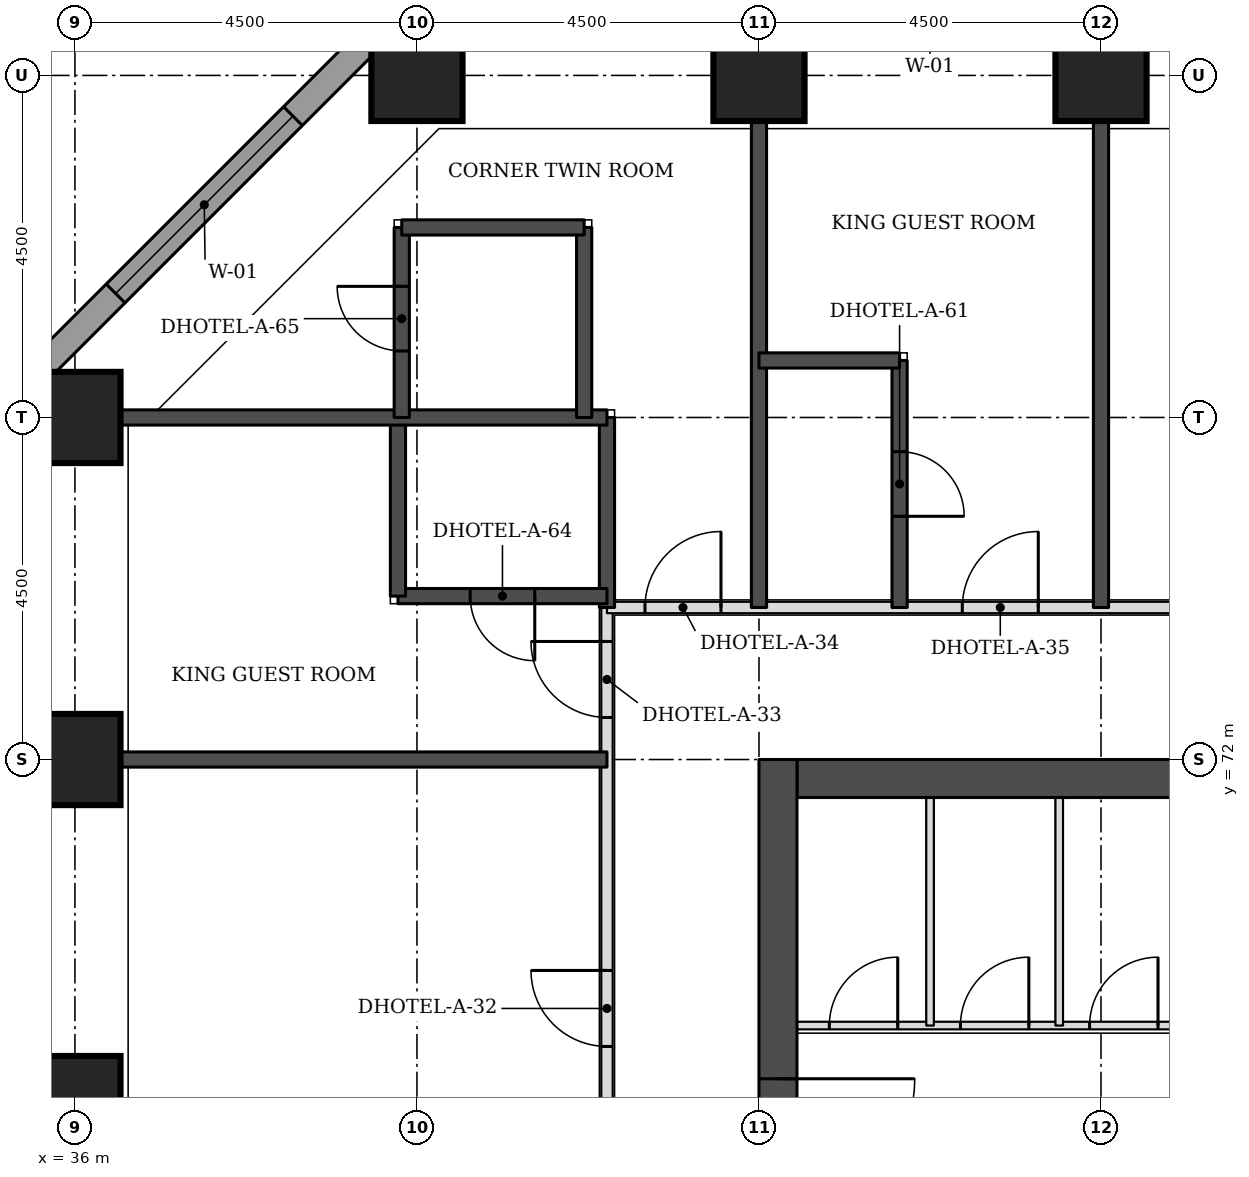
"""IFC4 building model, lengths in metres.
Left out: names, types, materials, properties, quantities, classifications, styles, units other than length and angle.
Written with IfcOpenShell. Run it as: python <this file> out.ifc"""

import sys

from ifc_helpers import new_model, si_unit, direction, frame, frame_2d, origin, origin_2d, place, context, subcontext, project, spatial, rectangle, extrude, element, fill, save


model = new_model("IFC4")
c1 = context("Model", 3, precision=1e-05, world=origin(), true_north=direction((0.0, 1.0)))
c2 = subcontext(c1, "Body", "Model", "MODEL_VIEW")
j1 = project(units=[si_unit("LENGTHUNIT", "METRE"), si_unit("PLANEANGLEUNIT", "RADIAN")], contexts=[c1])
p1 = place(None, origin())
s1 = spatial("IfcSite", under=j1, at=p1, CompositionType="ELEMENT")
p2 = place(p1, origin())
s2 = spatial("IfcBuilding", under=s1, at=p2, CompositionType="ELEMENT")
p3 = place(p2, frame((0.0, 0.0, 49.5)))
s3 = spatial("IfcBuildingStorey", under=s2, at=p3, CompositionType="ELEMENT", Elevation=49.5)
for number, where, z_axis, x_axis in (
    (1, (36.0, 67.5, 0.0), (0.0, 0.0, 1.0), (1.0, 0.0, 0.0)),
    (2, (36.0, 72.0, 0.0), (0.0, 0.0, 1.0), (1.0, 0.0, 0.0)),
    (3, (36.0, 76.5, 0.0), (0.0, 0.0, 1.0), (1.0, 0.0, 0.0)),
    (4, (40.5, 81.0, 0.0), (0.0, 0.0, 1.0), (1.0, 0.0, 0.0)),
    (5, (45.0, 81.0, 0.0), (0.0, 0.0, 1.0), (1.0, 0.0, 0.0)),
    (6, (49.5, 81.0, 0.0), (0.0, 0.0, 1.0), (1.0, 0.0, 0.0)),
):
    element("IfcColumn", number, at=place(p3, frame(where, z_axis=z_axis, x_axis=x_axis)), inside=s3, PredefinedType="COLUMN", context=c2, shape_type="SweptSolid", body=[
        extrude(rectangle(XDim=1.2, YDim=1.2, at=origin_2d()), origin(), (0.0, 0.0, 1.0), 3.3),
    ])
p4 = place(p3, frame((45.5, 71.75, 0.0), z_axis=(0.0, 0.0, 1.0), x_axis=(1.0, 0.0, 0.0)))
e7 = element("IfcWall", 7, at=p4, inside=s3, PredefinedType="SHEAR", context=c2, shape_type="SweptSolid", body=[
    extrude(rectangle(XDim=21.5, YDim=0.5, at=frame_2d((10.75, 0.0))), origin(), (0.0, 0.0, 1.0), 3.3),
])
p5 = place(p3, frame((45.25, 49.5, 0.0), z_axis=(0.0, 0.0, 1.0), x_axis=(0.0, 1.0, 0.0)))
e8 = element("IfcWall", 8, at=p5, inside=s3, PredefinedType="SHEAR", context=c2, shape_type="SweptSolid", body=[
    extrude(rectangle(XDim=22.5, YDim=0.5, at=frame_2d((11.25, 0.0))), origin(), (0.0, 0.0, 1.0), 3.3),
])
p6 = place(p5, frame((4.2, 0.0, 0.0)))
e9 = element("IfcOpeningElement", 9, at=p6, cuts=e8, PredefinedType="OPENING", context=c2, shape_type="SweptSolid", body=[
    extrude(rectangle(XDim=1.8, YDim=2.1, at=frame_2d((0.9, 1.05))), frame((0.0, 0.26, 0.0), z_axis=(0.0, -1.0, 0.0), x_axis=(1.0, 0.0, 0.0)), (0.0, 0.0, 1.0), 0.52),
])
p7 = place(p5, frame((6.9, 0.0, 0.0)))
e10 = element("IfcOpeningElement", 10, at=p7, cuts=e8, PredefinedType="OPENING", context=c2, shape_type="SweptSolid", body=[
    extrude(rectangle(XDim=1.1, YDim=2.1, at=frame_2d((0.55, 1.05))), frame((0.0, 0.26, 0.0), z_axis=(0.0, -1.0, 0.0), x_axis=(1.0, 0.0, 0.0)), (0.0, 0.0, 1.0), 0.52),
])
p8 = place(p5, frame((13.6, 0.0, 0.0)))
e11 = element("IfcOpeningElement", 11, at=p8, cuts=e8, PredefinedType="OPENING", context=c2, shape_type="SweptSolid", body=[
    extrude(rectangle(XDim=1.1, YDim=2.1, at=frame_2d((0.55, 1.05))), frame((0.0, 0.26, 0.0), z_axis=(0.0, -1.0, 0.0), x_axis=(1.0, 0.0, 0.0)), (0.0, 0.0, 1.0), 0.52),
])
p9 = place(p5, frame((16.5, 0.0, 0.0)))
e12 = element("IfcOpeningElement", 12, at=p9, cuts=e8, PredefinedType="OPENING", context=c2, shape_type="SweptSolid", body=[
    extrude(rectangle(XDim=1.8, YDim=2.1, at=frame_2d((0.9, 1.05))), frame((0.0, 0.26, 0.0), z_axis=(0.0, -1.0, 0.0), x_axis=(1.0, 0.0, 0.0)), (0.0, 0.0, 1.0), 0.52),
])
p10 = place(p3, frame((40.23, 81.826, 0.0), z_axis=(0.0, 0.0, 1.0), x_axis=(-0.707106781187, -0.707106781187, 0.0)))
e13 = element("IfcWall", 13, at=p10, inside=s3, PredefinedType="STANDARD", context=c2, shape_type="SweptSolid", body=[
    extrude(rectangle(XDim=7.151, YDim=0.35, at=frame_2d((3.576, 0.0))), origin(), (0.0, 0.0, 1.0), 3.055),
])
p11 = place(p10, frame((1.926, 0.0, 0.8)))
e14 = element("IfcOpeningElement", 14, at=p11, cuts=e13, PredefinedType="OPENING", context=c2, shape_type="SweptSolid", body=[
    extrude(rectangle(XDim=3.3, YDim=1.5, at=frame_2d((1.65, 0.75))), frame((0.0, 0.185, 0.0), z_axis=(0.0, -1.0, 0.0), x_axis=(1.0, 0.0, 0.0)), (0.0, 0.0, 1.0), 0.37),
])
p12 = place(p3, frame((43.0, 56.0, 0.0), z_axis=(0.0, 0.0, 1.0), x_axis=(0.0, 1.0, 0.0)))
e15 = element("IfcWall", 15, at=p12, inside=s3, PredefinedType="PARTITIONING", context=c2, shape_type="SweptSolid", body=[
    extrude(rectangle(XDim=18.0, YDim=0.15, at=frame_2d((9.0, 0.0))), origin(), (0.0, 0.0, 1.0), 3.08),
])
p13 = place(p12, frame((12.225, 0.0, 0.0)))
e16 = element("IfcOpeningElement", 16, at=p13, cuts=e15, PredefinedType="OPENING", context=c2, shape_type="SweptSolid", body=[
    extrude(rectangle(XDim=1.0, YDim=2.1, at=frame_2d((0.5, 1.05))), frame((0.0, 0.085, 0.0), z_axis=(0.0, -1.0, 0.0), x_axis=(1.0, 0.0, 0.0)), (0.0, 0.0, 1.0), 0.17),
])
p14 = place(p12, frame((16.553, 0.0, 0.0)))
e17 = element("IfcOpeningElement", 17, at=p14, cuts=e15, PredefinedType="OPENING", context=c2, shape_type="SweptSolid", body=[
    extrude(rectangle(XDim=1.0, YDim=2.1, at=frame_2d((0.5, 1.05))), frame((0.0, 0.085, 0.0), z_axis=(0.0, -1.0, 0.0), x_axis=(1.0, 0.0, 0.0)), (0.0, 0.0, 1.0), 0.17),
])
p15 = place(p12, frame((3.05, 0.0, 0.0)))
e18 = element("IfcOpeningElement", 18, at=p15, cuts=e15, PredefinedType="OPENING", context=c2, shape_type="SweptSolid", body=[
    extrude(rectangle(XDim=0.9, YDim=2.1, at=frame_2d((0.45, 1.05))), frame((0.0, 0.085, 0.0), z_axis=(0.0, -1.0, 0.0), x_axis=(1.0, 0.0, 0.0)), (0.0, 0.0, 1.0), 0.17),
])
p16 = place(p3, frame((43.0, 74.0, 0.0), z_axis=(0.0, 0.0, 1.0), x_axis=(1.0, 0.0, 0.0)))
e19 = element("IfcWall", 19, at=p16, inside=s3, PredefinedType="PARTITIONING", context=c2, shape_type="SweptSolid", body=[
    extrude(rectangle(XDim=26.5, YDim=0.15, at=frame_2d((13.25, 0.0))), origin(), (0.0, 0.0, 1.0), 3.08),
])
p17 = place(p16, frame((4.675, 0.0, 0.0)))
e20 = element("IfcOpeningElement", 20, at=p17, cuts=e19, PredefinedType="OPENING", context=c2, shape_type="SweptSolid", body=[
    extrude(rectangle(XDim=1.0, YDim=2.1, at=frame_2d((0.5, 1.05))), frame((0.0, 0.085, 0.0), z_axis=(0.0, -1.0, 0.0), x_axis=(1.0, 0.0, 0.0)), (0.0, 0.0, 1.0), 0.17),
])
p18 = place(p16, frame((9.025, 0.0, 0.0)))
e21 = element("IfcOpeningElement", 21, at=p18, cuts=e19, PredefinedType="OPENING", context=c2, shape_type="SweptSolid", body=[
    extrude(rectangle(XDim=1.0, YDim=2.1, at=frame_2d((0.5, 1.05))), frame((0.0, 0.085, 0.0), z_axis=(0.0, -1.0, 0.0), x_axis=(1.0, 0.0, 0.0)), (0.0, 0.0, 1.0), 0.17),
])
p19 = place(p16, frame((20.725, 0.0, 0.0)))
e22 = element("IfcOpeningElement", 22, at=p19, cuts=e19, PredefinedType="OPENING", context=c2, shape_type="SweptSolid", body=[
    extrude(rectangle(XDim=1.0, YDim=2.1, at=frame_2d((0.5, 1.05))), frame((0.0, 0.085, 0.0), z_axis=(0.0, -1.0, 0.0), x_axis=(1.0, 0.0, 0.0)), (0.0, 0.0, 1.0), 0.17),
])
p20 = place(p16, frame((0.5, 0.0, 0.0)))
e23 = element("IfcOpeningElement", 23, at=p20, cuts=e19, PredefinedType="OPENING", context=c2, shape_type="SweptSolid", body=[
    extrude(rectangle(XDim=1.0, YDim=2.1, at=frame_2d((0.5, 1.05))), frame((0.0, 0.085, 0.0), z_axis=(0.0, -1.0, 0.0), x_axis=(1.0, 0.0, 0.0)), (0.0, 0.0, 1.0), 0.17),
])
p21 = place(p16, frame((25.0, 0.0, 0.0)))
e24 = element("IfcOpeningElement", 24, at=p21, cuts=e19, PredefinedType="OPENING", context=c2, shape_type="SweptSolid", body=[
    extrude(rectangle(XDim=1.0, YDim=2.1, at=frame_2d((0.5, 1.05))), frame((0.0, 0.085, 0.0), z_axis=(0.0, -1.0, 0.0), x_axis=(1.0, 0.0, 0.0)), (0.0, 0.0, 1.0), 0.17),
])
p22 = place(p3, frame((36.6, 72.0, 0.0), z_axis=(0.0, 0.0, 1.0), x_axis=(1.0, 0.0, 0.0)))
e25 = element("IfcWall", 25, at=p22, inside=s3, PredefinedType="SOLIDWALL", context=c2, shape_type="SweptSolid", body=[
    extrude(rectangle(XDim=6.4, YDim=0.2, at=frame_2d((3.2, 0.0))), origin(), (0.0, 0.0, 1.0), 3.08),
])
p23 = place(p3, frame((43.0, 74.0, 0.0), z_axis=(0.0, 0.0, 1.0), x_axis=(0.0, 1.0, 0.0)))
e26 = element("IfcWall", 26, at=p23, inside=s3, PredefinedType="SOLIDWALL", context=c2, shape_type="SweptSolid", body=[
    extrude(rectangle(XDim=2.5, YDim=0.2, at=frame_2d((1.25, 0.0))), origin(), (0.0, 0.0, 1.0), 3.08),
])
p24 = place(p3, frame((45.0, 74.0, 0.0), z_axis=(0.0, 0.0, 1.0), x_axis=(0.0, 1.0, 0.0)))
e27 = element("IfcWall", 27, at=p24, inside=s3, PredefinedType="SOLIDWALL", context=c2, shape_type="SweptSolid", body=[
    extrude(rectangle(XDim=6.4, YDim=0.2, at=frame_2d((3.2, 0.0))), origin(), (0.0, 0.0, 1.0), 3.08),
])
p25 = place(p3, frame((46.85, 74.0, 0.0), z_axis=(0.0, 0.0, 1.0), x_axis=(0.0, 1.0, 0.0)))
e28 = element("IfcWall", 28, at=p25, inside=s3, PredefinedType="SOLIDWALL", context=c2, shape_type="SweptSolid", body=[
    extrude(rectangle(XDim=3.25, YDim=0.2, at=frame_2d((1.625, 0.0))), origin(), (0.0, 0.0, 1.0), 3.08),
])
p26 = place(p25, frame((1.2, 0.0, 0.0)))
e29 = element("IfcOpeningElement", 29, at=p26, cuts=e28, PredefinedType="OPENING", context=c2, shape_type="SweptSolid", body=[
    extrude(rectangle(XDim=0.85, YDim=2.1, at=frame_2d((0.425, 1.05))), frame((0.0, 0.11, 0.0), z_axis=(0.0, -1.0, 0.0), x_axis=(1.0, 0.0, 0.0)), (0.0, 0.0, 1.0), 0.22),
])
p27 = place(p3, frame((49.5, 74.0, 0.0), z_axis=(0.0, 0.0, 1.0), x_axis=(0.0, 1.0, 0.0)))
e30 = element("IfcWall", 30, at=p27, inside=s3, PredefinedType="SOLIDWALL", context=c2, shape_type="SweptSolid", body=[
    extrude(rectangle(XDim=6.4, YDim=0.2, at=frame_2d((3.2, 0.0))), origin(), (0.0, 0.0, 1.0), 3.08),
])
p28 = place(p3, frame((40.25, 74.15, 0.0), z_axis=(0.0, 0.0, 1.0), x_axis=(1.0, 0.0, 0.0)))
e31 = element("IfcWall", 31, at=p28, inside=s3, PredefinedType="SOLIDWALL", context=c2, shape_type="SweptSolid", body=[
    extrude(rectangle(XDim=2.75, YDim=0.2, at=frame_2d((1.375, 0.0))), origin(), (0.0, 0.0, 1.0), 3.08),
])
p29 = place(p28, frame((0.95, 0.0, 0.0)))
e32 = element("IfcOpeningElement", 32, at=p29, cuts=e31, PredefinedType="OPENING", context=c2, shape_type="SweptSolid", body=[
    extrude(rectangle(XDim=0.85, YDim=2.1, at=frame_2d((0.425, 1.05))), frame((0.0, 0.11, 0.0), z_axis=(0.0, -1.0, 0.0), x_axis=(1.0, 0.0, 0.0)), (0.0, 0.0, 1.0), 0.22),
])
p30 = place(p3, frame((40.25, 74.15, 0.0), z_axis=(0.0, 0.0, 1.0), x_axis=(0.0, 1.0, 0.0)))
e33 = element("IfcWall", 33, at=p30, inside=s3, PredefinedType="SOLIDWALL", context=c2, shape_type="SweptSolid", body=[
    extrude(rectangle(XDim=2.35, YDim=0.2, at=frame_2d((1.175, 0.0))), origin(), (0.0, 0.0, 1.0), 3.08),
])
p31 = place(p3, frame((36.6, 76.5, 0.0), z_axis=(0.0, 0.0, 1.0), x_axis=(1.0, 0.0, 0.0)))
e34 = element("IfcWall", 34, at=p31, inside=s3, PredefinedType="SOLIDWALL", context=c2, shape_type="SweptSolid", body=[
    extrude(rectangle(XDim=6.4, YDim=0.2, at=frame_2d((3.2, 0.0))), origin(), (0.0, 0.0, 1.0), 3.08),
])
p32 = place(p3, frame((40.3, 76.5, 0.0), z_axis=(0.0, 0.0, 1.0), x_axis=(0.0, 1.0, 0.0)))
e35 = element("IfcWall", 35, at=p32, inside=s3, PredefinedType="SOLIDWALL", context=c2, shape_type="SweptSolid", body=[
    extrude(rectangle(XDim=2.5, YDim=0.2, at=frame_2d((1.25, 0.0))), origin(), (0.0, 0.0, 1.0), 3.08),
])
p33 = place(p32, frame((0.875, 0.0, 0.0)))
e36 = element("IfcOpeningElement", 36, at=p33, cuts=e35, PredefinedType="OPENING", context=c2, shape_type="SweptSolid", body=[
    extrude(rectangle(XDim=0.85, YDim=2.1, at=frame_2d((0.425, 1.05))), frame((0.0, 0.11, 0.0), z_axis=(0.0, -1.0, 0.0), x_axis=(1.0, 0.0, 0.0)), (0.0, 0.0, 1.0), 0.22),
])
p34 = place(p3, frame((42.7, 76.5, 0.0), z_axis=(0.0, 0.0, 1.0), x_axis=(0.0, 1.0, 0.0)))
e37 = element("IfcWall", 37, at=p34, inside=s3, PredefinedType="SOLIDWALL", context=c2, shape_type="SweptSolid", body=[
    extrude(rectangle(XDim=2.5, YDim=0.2, at=frame_2d((1.25, 0.0))), origin(), (0.0, 0.0, 1.0), 3.08),
])
p35 = place(p3, frame((45.0, 77.25, 0.0), z_axis=(0.0, 0.0, 1.0), x_axis=(1.0, 0.0, 0.0)))
e38 = element("IfcWall", 38, at=p35, inside=s3, PredefinedType="SOLIDWALL", context=c2, shape_type="SweptSolid", body=[
    extrude(rectangle(XDim=1.85, YDim=0.2, at=frame_2d((0.925, 0.0))), origin(), (0.0, 0.0, 1.0), 3.08),
])
p36 = place(p3, frame((40.3, 79.0, 0.0), z_axis=(0.0, 0.0, 1.0), x_axis=(1.0, 0.0, 0.0)))
e39 = element("IfcWall", 39, at=p36, inside=s3, PredefinedType="SOLIDWALL", context=c2, shape_type="SweptSolid", body=[
    extrude(rectangle(XDim=2.4, YDim=0.2, at=frame_2d((1.2, 0.0))), origin(), (0.0, 0.0, 1.0), 3.08),
])
p37 = place(p3, frame((45.5, 68.5, 0.0), z_axis=(0.0, 0.0, 1.0), x_axis=(1.0, 0.0, 0.0)))
e40 = element("IfcWall", 40, at=p37, inside=s3, PredefinedType="PARTITIONING", context=c2, shape_type="SweptSolid", body=[
    extrude(rectangle(XDim=5.15, YDim=0.1, at=frame_2d((2.575, 0.0))), origin(), (0.0, 0.0, 1.0), 3.08),
])
p38 = place(p37, frame((0.426, 0.0, 0.0)))
e41 = element("IfcOpeningElement", 41, at=p38, cuts=e40, PredefinedType="OPENING", context=c2, shape_type="SweptSolid", body=[
    extrude(rectangle(XDim=0.9, YDim=2.1, at=frame_2d((0.45, 1.05))), frame((0.0, 0.06, 0.0), z_axis=(0.0, -1.0, 0.0), x_axis=(1.0, 0.0, 0.0)), (0.0, 0.0, 1.0), 0.12),
])
p39 = place(p37, frame((2.151, 0.0, 0.0)))
e42 = element("IfcOpeningElement", 42, at=p39, cuts=e40, PredefinedType="OPENING", context=c2, shape_type="SweptSolid", body=[
    extrude(rectangle(XDim=0.9, YDim=2.1, at=frame_2d((0.45, 1.05))), frame((0.0, 0.06, 0.0), z_axis=(0.0, -1.0, 0.0), x_axis=(1.0, 0.0, 0.0)), (0.0, 0.0, 1.0), 0.12),
])
p40 = place(p37, frame((3.85, 0.0, 0.0)))
e43 = element("IfcOpeningElement", 43, at=p40, cuts=e40, PredefinedType="OPENING", context=c2, shape_type="SweptSolid", body=[
    extrude(rectangle(XDim=0.9, YDim=2.1, at=frame_2d((0.45, 1.05))), frame((0.0, 0.06, 0.0), z_axis=(0.0, -1.0, 0.0), x_axis=(1.0, 0.0, 0.0)), (0.0, 0.0, 1.0), 0.12),
])
for number, where, z_axis, x_axis in (
    (44, (47.251, 68.5, 0.0), (0.0, 0.0, 1.0), (0.0, 1.0, 0.0)),
    (45, (48.95, 68.5, 0.0), (0.0, 0.0, 1.0), (0.0, 1.0, 0.0)),
):
    element("IfcWall", number, at=place(p3, frame(where, z_axis=z_axis, x_axis=x_axis)), inside=s3, PredefinedType="PARTITIONING", context=c2, shape_type="SweptSolid", body=[
        extrude(rectangle(XDim=3.0, YDim=0.1, at=frame_2d((1.5, 0.0))), origin(), (0.0, 0.0, 1.0), 3.08),
    ])
p41 = place(p11, origin())
e46 = element("IfcWindow", 46, at=p41, inside=s3, PartitioningType="SINGLE_PANEL", PredefinedType="WINDOW", context=c2, shape_type="SweptSolid", body=[
    extrude(rectangle(XDim=3.3, YDim=1.5, at=frame_2d((1.65, 0.75))), frame((0.0, 0.085, 0.0), z_axis=(0.0, -1.0, 0.0), x_axis=(1.0, 0.0, 0.0)), (0.0, 0.0, 1.0), 0.06),
])
fill(e14, e46)
p42 = place(p13, origin())
e47 = element("IfcDoor", 47, at=p42, inside=s3, OperationType="SINGLE_SWING_RIGHT", PredefinedType="DOOR", context=c2, shape_type="SweptSolid", body=[
    extrude(rectangle(XDim=1.0, YDim=2.1, at=frame_2d((0.5, 1.05))), frame((0.0, 0.025, 0.0), z_axis=(0.0, -1.0, 0.0), x_axis=(1.0, 0.0, 0.0)), (0.0, 0.0, 1.0), 0.05),
])
fill(e16, e47)
p43 = place(p14, origin())
e48 = element("IfcDoor", 48, at=p43, inside=s3, OperationType="SINGLE_SWING_RIGHT", PredefinedType="DOOR", context=c2, shape_type="SweptSolid", body=[
    extrude(rectangle(XDim=1.0, YDim=2.1, at=frame_2d((0.5, 1.05))), frame((0.0, 0.025, 0.0), z_axis=(0.0, -1.0, 0.0), x_axis=(1.0, 0.0, 0.0)), (0.0, 0.0, 1.0), 0.05),
])
fill(e17, e48)
p44 = place(p29, frame((0.85, 0.0, 0.0), z_axis=(0.0, 0.0, 1.0), x_axis=(-1.0, 0.0, 0.0)))
e49 = element("IfcDoor", 49, at=p44, inside=s3, OperationType="SINGLE_SWING_LEFT", PredefinedType="DOOR", context=c2, shape_type="SweptSolid", body=[
    extrude(rectangle(XDim=0.85, YDim=2.1, at=frame_2d((0.425, 1.05))), frame((0.0, 0.025, 0.0), z_axis=(0.0, -1.0, 0.0), x_axis=(1.0, 0.0, 0.0)), (0.0, 0.0, 1.0), 0.05),
])
fill(e32, e49)
p45 = place(p17, origin())
e50 = element("IfcDoor", 50, at=p45, inside=s3, OperationType="SINGLE_SWING_RIGHT", PredefinedType="DOOR", context=c2, shape_type="SweptSolid", body=[
    extrude(rectangle(XDim=1.0, YDim=2.1, at=frame_2d((0.5, 1.05))), frame((0.0, 0.025, 0.0), z_axis=(0.0, -1.0, 0.0), x_axis=(1.0, 0.0, 0.0)), (0.0, 0.0, 1.0), 0.05),
])
fill(e20, e50)
p46 = place(p26, frame((0.85, 0.0, 0.0), z_axis=(0.0, 0.0, 1.0), x_axis=(-1.0, 0.0, 0.0)))
e51 = element("IfcDoor", 51, at=p46, inside=s3, OperationType="SINGLE_SWING_RIGHT", PredefinedType="DOOR", context=c2, shape_type="SweptSolid", body=[
    extrude(rectangle(XDim=0.85, YDim=2.1, at=frame_2d((0.425, 1.05))), frame((0.0, 0.025, 0.0), z_axis=(0.0, -1.0, 0.0), x_axis=(1.0, 0.0, 0.0)), (0.0, 0.0, 1.0), 0.05),
])
fill(e29, e51)
p47 = place(p20, origin())
e52 = element("IfcDoor", 52, at=p47, inside=s3, OperationType="SINGLE_SWING_RIGHT", PredefinedType="DOOR", context=c2, shape_type="SweptSolid", body=[
    extrude(rectangle(XDim=1.0, YDim=2.1, at=frame_2d((0.5, 1.05))), frame((0.0, 0.025, 0.0), z_axis=(0.0, -1.0, 0.0), x_axis=(1.0, 0.0, 0.0)), (0.0, 0.0, 1.0), 0.05),
])
fill(e23, e52)
p48 = place(p33, origin())
e53 = element("IfcDoor", 53, at=p48, inside=s3, OperationType="SINGLE_SWING_RIGHT", PredefinedType="DOOR", context=c2, shape_type="SweptSolid", body=[
    extrude(rectangle(XDim=0.85, YDim=2.1, at=frame_2d((0.425, 1.05))), frame((0.0, 0.025, 0.0), z_axis=(0.0, -1.0, 0.0), x_axis=(1.0, 0.0, 0.0)), (0.0, 0.0, 1.0), 0.05),
])
fill(e36, e53)
p49 = place(p9, frame((1.8, 0.0, 0.0), z_axis=(0.0, 0.0, 1.0), x_axis=(-1.0, 0.0, 0.0)))
e54 = element("IfcDoor", 54, at=p49, inside=s3, OperationType="SINGLE_SWING_LEFT", PredefinedType="DOOR", context=c2, shape_type="SweptSolid", body=[
    extrude(rectangle(XDim=1.8, YDim=2.1, at=frame_2d((0.9, 1.05))), frame((0.0, 0.025, 0.0), z_axis=(0.0, -1.0, 0.0), x_axis=(1.0, 0.0, 0.0)), (0.0, 0.0, 1.0), 0.05),
])
fill(e12, e54)
p50 = place(p38, origin())
e55 = element("IfcDoor", 55, at=p50, inside=s3, OperationType="SINGLE_SWING_RIGHT", PredefinedType="DOOR", context=c2, shape_type="SweptSolid", body=[
    extrude(rectangle(XDim=0.9, YDim=2.1, at=frame_2d((0.45, 1.05))), frame((0.0, 0.025, 0.0), z_axis=(0.0, -1.0, 0.0), x_axis=(1.0, 0.0, 0.0)), (0.0, 0.0, 1.0), 0.05),
])
fill(e41, e55)
p51 = place(p39, origin())
e56 = element("IfcDoor", 56, at=p51, inside=s3, OperationType="SINGLE_SWING_RIGHT", PredefinedType="DOOR", context=c2, shape_type="SweptSolid", body=[
    extrude(rectangle(XDim=0.9, YDim=2.1, at=frame_2d((0.45, 1.05))), frame((0.0, 0.025, 0.0), z_axis=(0.0, -1.0, 0.0), x_axis=(1.0, 0.0, 0.0)), (0.0, 0.0, 1.0), 0.05),
])
fill(e42, e56)
p52 = place(p40, origin())
e57 = element("IfcDoor", 57, at=p52, inside=s3, OperationType="SINGLE_SWING_RIGHT", PredefinedType="DOOR", context=c2, shape_type="SweptSolid", body=[
    extrude(rectangle(XDim=0.9, YDim=2.1, at=frame_2d((0.45, 1.05))), frame((0.0, 0.025, 0.0), z_axis=(0.0, -1.0, 0.0), x_axis=(1.0, 0.0, 0.0)), (0.0, 0.0, 1.0), 0.05),
])
fill(e43, e57)
save(model, sys.argv[1])
